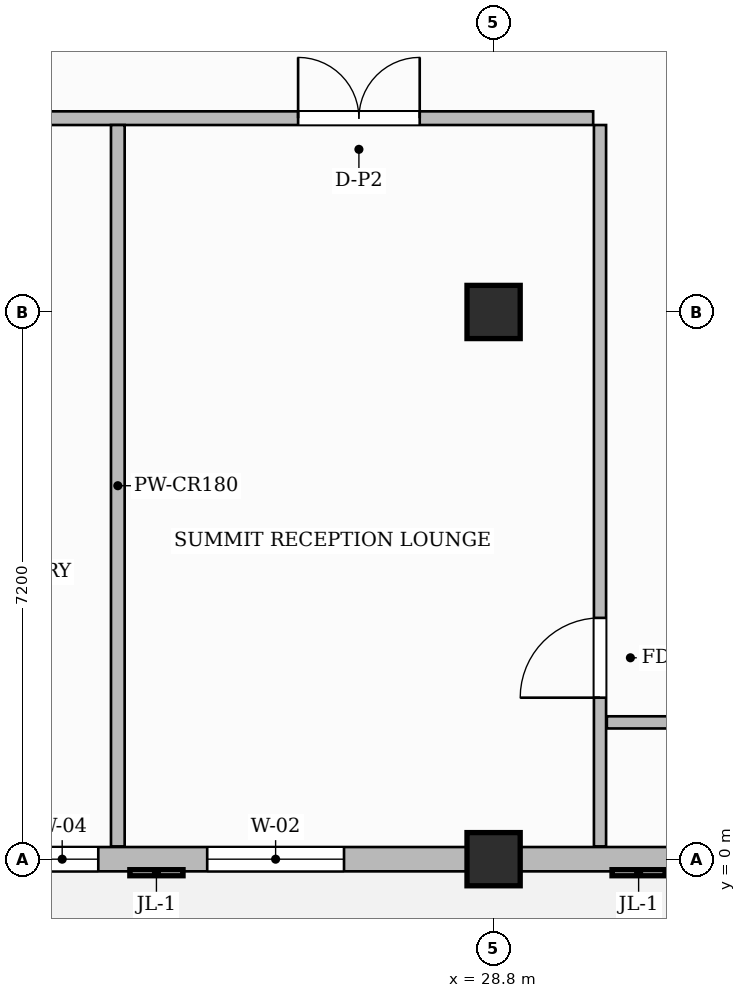
"""IFC4 building model, lengths in metres.
Left out: names, types, materials, properties, quantities, classifications, styles, units other than length and angle.
Written with IfcOpenShell. Run it as: python <this file> out.ifc"""

import sys

from ifc_helpers import new_model, si_unit, direction, frame, frame_2d, origin, origin_2d, place, context, subcontext, project, spatial, rectangle, extrude, source, transform, mapped, element, fill, save


model = new_model("IFC4")
c1 = context("Model", 3, precision=1e-05, world=origin(), true_north=direction((0.0, 1.0)))
c2 = subcontext(c1, "Body", "Model", "MODEL_VIEW")
j1 = project(units=[si_unit("LENGTHUNIT", "METRE"), si_unit("PLANEANGLEUNIT", "RADIAN")], contexts=[c1])
p1 = place(None, origin())
s1 = spatial("IfcSite", under=j1, at=p1, CompositionType="ELEMENT")
p2 = place(p1, origin())
s2 = spatial("IfcBuilding", under=s1, at=p2, CompositionType="ELEMENT")
p3 = place(p2, frame((0.0, 0.0, 294.3)))
s3 = spatial("IfcBuildingStorey", under=s2, at=p3, CompositionType="ELEMENT", Elevation=294.3)
m1 = source(origin(), c2, "Body", "SweptSolid", [
    extrude(rectangle(XDim=0.7, YDim=0.7, at=origin_2d()), origin(), (0.0, 0.0, 1.0), 4.8),
])
for number, where, z_axis, x_axis in (
    (1, (28.8, 0.0, 0.0), (0.0, 0.0, 1.0), (1.0, 0.0, 0.0)),
    (2, (28.8, 7.2, 0.0), (0.0, 0.0, 1.0), (1.0, 0.0, 0.0)),
):
    element("IfcColumn", number, at=place(p3, frame(where, z_axis=z_axis, x_axis=x_axis)), inside=s3, PredefinedType="COLUMN", context=c2, shape_type="MappedRepresentation", body=[
        mapped(m1, transform((0.0, 0.0, 0.0), scale=1.0)),
    ])
p4 = place(p3, frame((18.168, 9.75, 0.0), z_axis=(0.0, 0.0, 1.0), x_axis=(1.0, 0.0, 0.0)))
e3 = element("IfcWall", 3, at=p4, inside=s3, PredefinedType="PARTITIONING", context=c2, shape_type="SweptSolid", body=[
    extrude(rectangle(XDim=11.942, YDim=0.18, at=frame_2d((5.971, 0.0))), origin(), (0.0, 0.0, 1.0), 4.5),
])
p5 = place(p4, frame((1.96, 0.0, 0.0)))
e4 = element("IfcOpeningElement", 4, at=p5, cuts=e3, PredefinedType="OPENING", context=c2, shape_type="SweptSolid", body=[
    extrude(rectangle(XDim=1.6, YDim=2.4, at=frame_2d((0.8, 1.2))), frame((0.0, 0.1, 0.0), z_axis=(0.0, -1.0, 0.0), x_axis=(1.0, 0.0, 0.0)), (0.0, 0.0, 1.0), 0.2),
])
p6 = place(p4, frame((8.06, 0.0, 0.0)))
e5 = element("IfcOpeningElement", 5, at=p6, cuts=e3, PredefinedType="OPENING", context=c2, shape_type="SweptSolid", body=[
    extrude(rectangle(XDim=1.6, YDim=2.4, at=frame_2d((0.8, 1.2))), frame((0.0, 0.1, 0.0), z_axis=(0.0, -1.0, 0.0), x_axis=(1.0, 0.0, 0.0)), (0.0, 0.0, 1.0), 0.2),
])
p7 = place(p3, frame((30.2, 0.168, 0.0), z_axis=(0.0, 0.0, 1.0), x_axis=(0.0, 1.0, 0.0)))
e6 = element("IfcWall", 6, at=p7, inside=s3, PredefinedType="PARTITIONING", context=c2, shape_type="SweptSolid", body=[
    extrude(rectangle(XDim=9.492, YDim=0.16, at=frame_2d((4.746, 0.0))), origin(), (0.0, 0.0, 1.0), 4.5),
])
p8 = place(p7, frame((1.957, 0.0, 0.0)))
e7 = element("IfcOpeningElement", 7, at=p8, cuts=e6, PredefinedType="OPENING", context=c2, shape_type="SweptSolid", body=[
    extrude(rectangle(XDim=1.05, YDim=2.15, at=frame_2d((0.525, 1.075))), frame((0.0, 0.09, 0.0), z_axis=(0.0, -1.0, 0.0), x_axis=(1.0, 0.0, 0.0)), (0.0, 0.0, 1.0), 0.18),
])
p9 = place(p3, frame((30.29, 1.8, 0.0), z_axis=(0.0, 0.0, 1.0), x_axis=(1.0, 0.0, 0.0)))
e8 = element("IfcWall", 8, at=p9, inside=s3, PredefinedType="PARTITIONING", context=c2, shape_type="SweptSolid", body=[
    extrude(rectangle(XDim=19.37, YDim=0.16, at=frame_2d((9.685, 0.0))), origin(), (0.0, 0.0, 1.0), 4.5),
])
p10 = place(p9, frame((3.054, 0.0, 0.0)))
e9 = element("IfcOpeningElement", 9, at=p10, cuts=e8, PredefinedType="OPENING", context=c2, shape_type="SweptSolid", body=[
    extrude(rectangle(XDim=0.9, YDim=2.15, at=frame_2d((0.45, 1.075))), frame((0.0, 0.09, 0.0), z_axis=(0.0, -1.0, 0.0), x_axis=(1.0, 0.0, 0.0)), (0.0, 0.0, 1.0), 0.18),
])
p11 = place(p9, frame((9.66, 0.0, 0.0)))
e10 = element("IfcOpeningElement", 10, at=p11, cuts=e8, PredefinedType="OPENING", context=c2, shape_type="SweptSolid", body=[
    extrude(rectangle(XDim=0.9, YDim=2.15, at=frame_2d((0.45, 1.075))), frame((0.0, 0.09, 0.0), z_axis=(0.0, -1.0, 0.0), x_axis=(1.0, 0.0, 0.0)), (0.0, 0.0, 1.0), 0.18),
])
p12 = place(p9, frame((15.86, 0.0, 0.0)))
e11 = element("IfcOpeningElement", 11, at=p12, cuts=e8, PredefinedType="OPENING", context=c2, shape_type="SweptSolid", body=[
    extrude(rectangle(XDim=0.9, YDim=2.15, at=frame_2d((0.45, 1.075))), frame((0.0, 0.09, 0.0), z_axis=(0.0, -1.0, 0.0), x_axis=(1.0, 0.0, 0.0)), (0.0, 0.0, 1.0), 0.18),
])
p13 = place(p3, frame((23.856, 0.168, 0.0), z_axis=(0.0, 0.0, 1.0), x_axis=(0.0, 1.0, 0.0)))
e12 = element("IfcWall", 12, at=p13, inside=s3, PredefinedType="PARTITIONING", context=c2, shape_type="SweptSolid", body=[
    extrude(rectangle(XDim=9.492, YDim=0.18, at=frame_2d((4.746, 0.0))), origin(), (0.0, 0.0, 1.0), 4.5),
])
p14 = place(p3, frame((18.0, 0.0, 0.0), z_axis=(0.0, 0.0, 1.0), x_axis=(1.0, 0.0, 0.0)))
e13 = element("IfcWall", 13, at=p14, inside=s3, PredefinedType="SOLIDWALL", context=c2, shape_type="SweptSolid", body=[
    extrude(rectangle(XDim=31.8, YDim=0.32, at=frame_2d((15.9, 0.0))), origin(), (0.0, 0.0, 1.0), 3.785),
])
p15 = place(p14, frame((0.42, 0.0, 0.0)))
e14 = element("IfcOpeningElement", 14, at=p15, cuts=e13, PredefinedType="OPENING", context=c2, shape_type="SweptSolid", body=[
    extrude(rectangle(XDim=1.2, YDim=2.2, at=frame_2d((0.6, 1.1))), frame((0.0, 0.17, 0.0), z_axis=(0.0, -1.0, 0.0), x_axis=(1.0, 0.0, 0.0)), (0.0, 0.0, 1.0), 0.34),
])
p16 = place(p14, frame((4.649, 0.0, 0.8)))
e15 = element("IfcOpeningElement", 15, at=p16, cuts=e13, PredefinedType="OPENING", context=c2, shape_type="SweptSolid", body=[
    extrude(rectangle(XDim=0.95, YDim=1.75, at=frame_2d((0.475, 0.875))), frame((0.0, 0.17, 0.0), z_axis=(0.0, -1.0, 0.0), x_axis=(1.0, 0.0, 0.0)), (0.0, 0.0, 1.0), 0.34),
])
p17 = place(p14, frame((7.032, 0.0, 0.8)))
e16 = element("IfcOpeningElement", 16, at=p17, cuts=e13, PredefinedType="OPENING", context=c2, shape_type="SweptSolid", body=[
    extrude(rectangle(XDim=1.8, YDim=1.85, at=frame_2d((0.9, 0.925))), frame((0.0, 0.17, 0.0), z_axis=(0.0, -1.0, 0.0), x_axis=(1.0, 0.0, 0.0)), (0.0, 0.0, 1.0), 0.34),
])
p18 = place(p14, frame((13.204, 0.0, 0.8)))
e17 = element("IfcOpeningElement", 17, at=p18, cuts=e13, PredefinedType="OPENING", context=c2, shape_type="SweptSolid", body=[
    extrude(rectangle(XDim=1.8, YDim=1.85, at=frame_2d((0.9, 0.925))), frame((0.0, 0.17, 0.0), z_axis=(0.0, -1.0, 0.0), x_axis=(1.0, 0.0, 0.0)), (0.0, 0.0, 1.0), 0.34),
])
p19 = place(p14, frame((17.921, 0.0, 0.8)))
e18 = element("IfcOpeningElement", 18, at=p19, cuts=e13, PredefinedType="OPENING", context=c2, shape_type="SweptSolid", body=[
    extrude(rectangle(XDim=0.95, YDim=1.75, at=frame_2d((0.475, 0.875))), frame((0.0, 0.17, 0.0), z_axis=(0.0, -1.0, 0.0), x_axis=(1.0, 0.0, 0.0)), (0.0, 0.0, 1.0), 0.34),
])
p20 = place(p14, frame((20.304, 0.0, 0.8)))
e19 = element("IfcOpeningElement", 19, at=p20, cuts=e13, PredefinedType="OPENING", context=c2, shape_type="SweptSolid", body=[
    extrude(rectangle(XDim=1.8, YDim=1.85, at=frame_2d((0.9, 0.925))), frame((0.0, 0.17, 0.0), z_axis=(0.0, -1.0, 0.0), x_axis=(1.0, 0.0, 0.0)), (0.0, 0.0, 1.0), 0.34),
])
p21 = place(p14, frame((26.081, 0.0, 0.8)))
e20 = element("IfcOpeningElement", 20, at=p21, cuts=e13, PredefinedType="OPENING", context=c2, shape_type="SweptSolid", body=[
    extrude(rectangle(XDim=1.8, YDim=1.85, at=frame_2d((0.9, 0.925))), frame((0.0, 0.17, 0.0), z_axis=(0.0, -1.0, 0.0), x_axis=(1.0, 0.0, 0.0)), (0.0, 0.0, 1.0), 0.34),
])
p22 = place(p14, frame((28.727, 0.0, 0.8)))
e21 = element("IfcOpeningElement", 21, at=p22, cuts=e13, PredefinedType="OPENING", context=c2, shape_type="SweptSolid", body=[
    extrude(rectangle(XDim=1.8, YDim=1.85, at=frame_2d((0.9, 0.925))), frame((0.0, 0.17, 0.0), z_axis=(0.0, -1.0, 0.0), x_axis=(1.0, 0.0, 0.0)), (0.0, 0.0, 1.0), 0.34),
])
m2 = source(origin(), c2, "Body", "SweptSolid", [
    extrude(rectangle(XDim=1.05, YDim=2.15, at=frame_2d((0.525, 1.075))), frame((0.0, 0.025, 0.0), z_axis=(0.0, -1.0, 0.0), x_axis=(1.0, 0.0, 0.0)), (0.0, 0.0, 1.0), 0.05),
])
p23 = place(p8, origin())
e22 = element("IfcDoor", 22, at=p23, inside=s3, OperationType="SINGLE_SWING_LEFT", PredefinedType="DOOR", context=c2, shape_type="MappedRepresentation", body=[
    mapped(m2, transform((0.0, 0.0, 0.0), scale=1.0)),
])
fill(e7, e22)
m3 = source(origin(), c2, "Body", "SweptSolid", [
    extrude(rectangle(XDim=1.6, YDim=2.4, at=frame_2d((0.8, 1.2))), frame((0.0, 0.025, 0.0), z_axis=(0.0, -1.0, 0.0), x_axis=(1.0, 0.0, 0.0)), (0.0, 0.0, 1.0), 0.05),
])
p24 = place(p6, origin())
e23 = element("IfcDoor", 23, at=p24, inside=s3, OperationType="DOUBLE_DOOR_SINGLE_SWING", PredefinedType="DOOR", context=c2, shape_type="MappedRepresentation", body=[
    mapped(m3, transform((0.0, 0.0, 0.0), scale=1.0)),
])
fill(e5, e23)
m4 = source(origin(), c2, "Body", "SweptSolid", [
    extrude(rectangle(XDim=0.95, YDim=1.75, at=frame_2d((0.475, 0.875))), frame((0.0, 0.03, 0.0), z_axis=(0.0, -1.0, 0.0), x_axis=(1.0, 0.0, 0.0)), (0.0, 0.0, 1.0), 0.06),
])
p25 = place(p16, origin())
e24 = element("IfcWindow", 24, at=p25, inside=s3, PartitioningType="SINGLE_PANEL", PredefinedType="WINDOW", context=c2, shape_type="MappedRepresentation", body=[
    mapped(m4, transform((0.0, 0.0, 0.0), scale=1.0)),
])
fill(e15, e24)
m5 = source(origin(), c2, "Body", "SweptSolid", [
    extrude(rectangle(XDim=1.8, YDim=1.85, at=frame_2d((0.9, 0.925))), frame((0.0, 0.03, 0.0), z_axis=(0.0, -1.0, 0.0), x_axis=(1.0, 0.0, 0.0)), (0.0, 0.0, 1.0), 0.06),
])
p26 = place(p17, origin())
e25 = element("IfcWindow", 25, at=p26, inside=s3, PartitioningType="DOUBLE_PANEL_VERTICAL", PredefinedType="WINDOW", context=c2, shape_type="MappedRepresentation", body=[
    mapped(m5, transform((0.0, 0.0, 0.0), scale=1.0)),
])
fill(e16, e25)
save(model, sys.argv[1])
